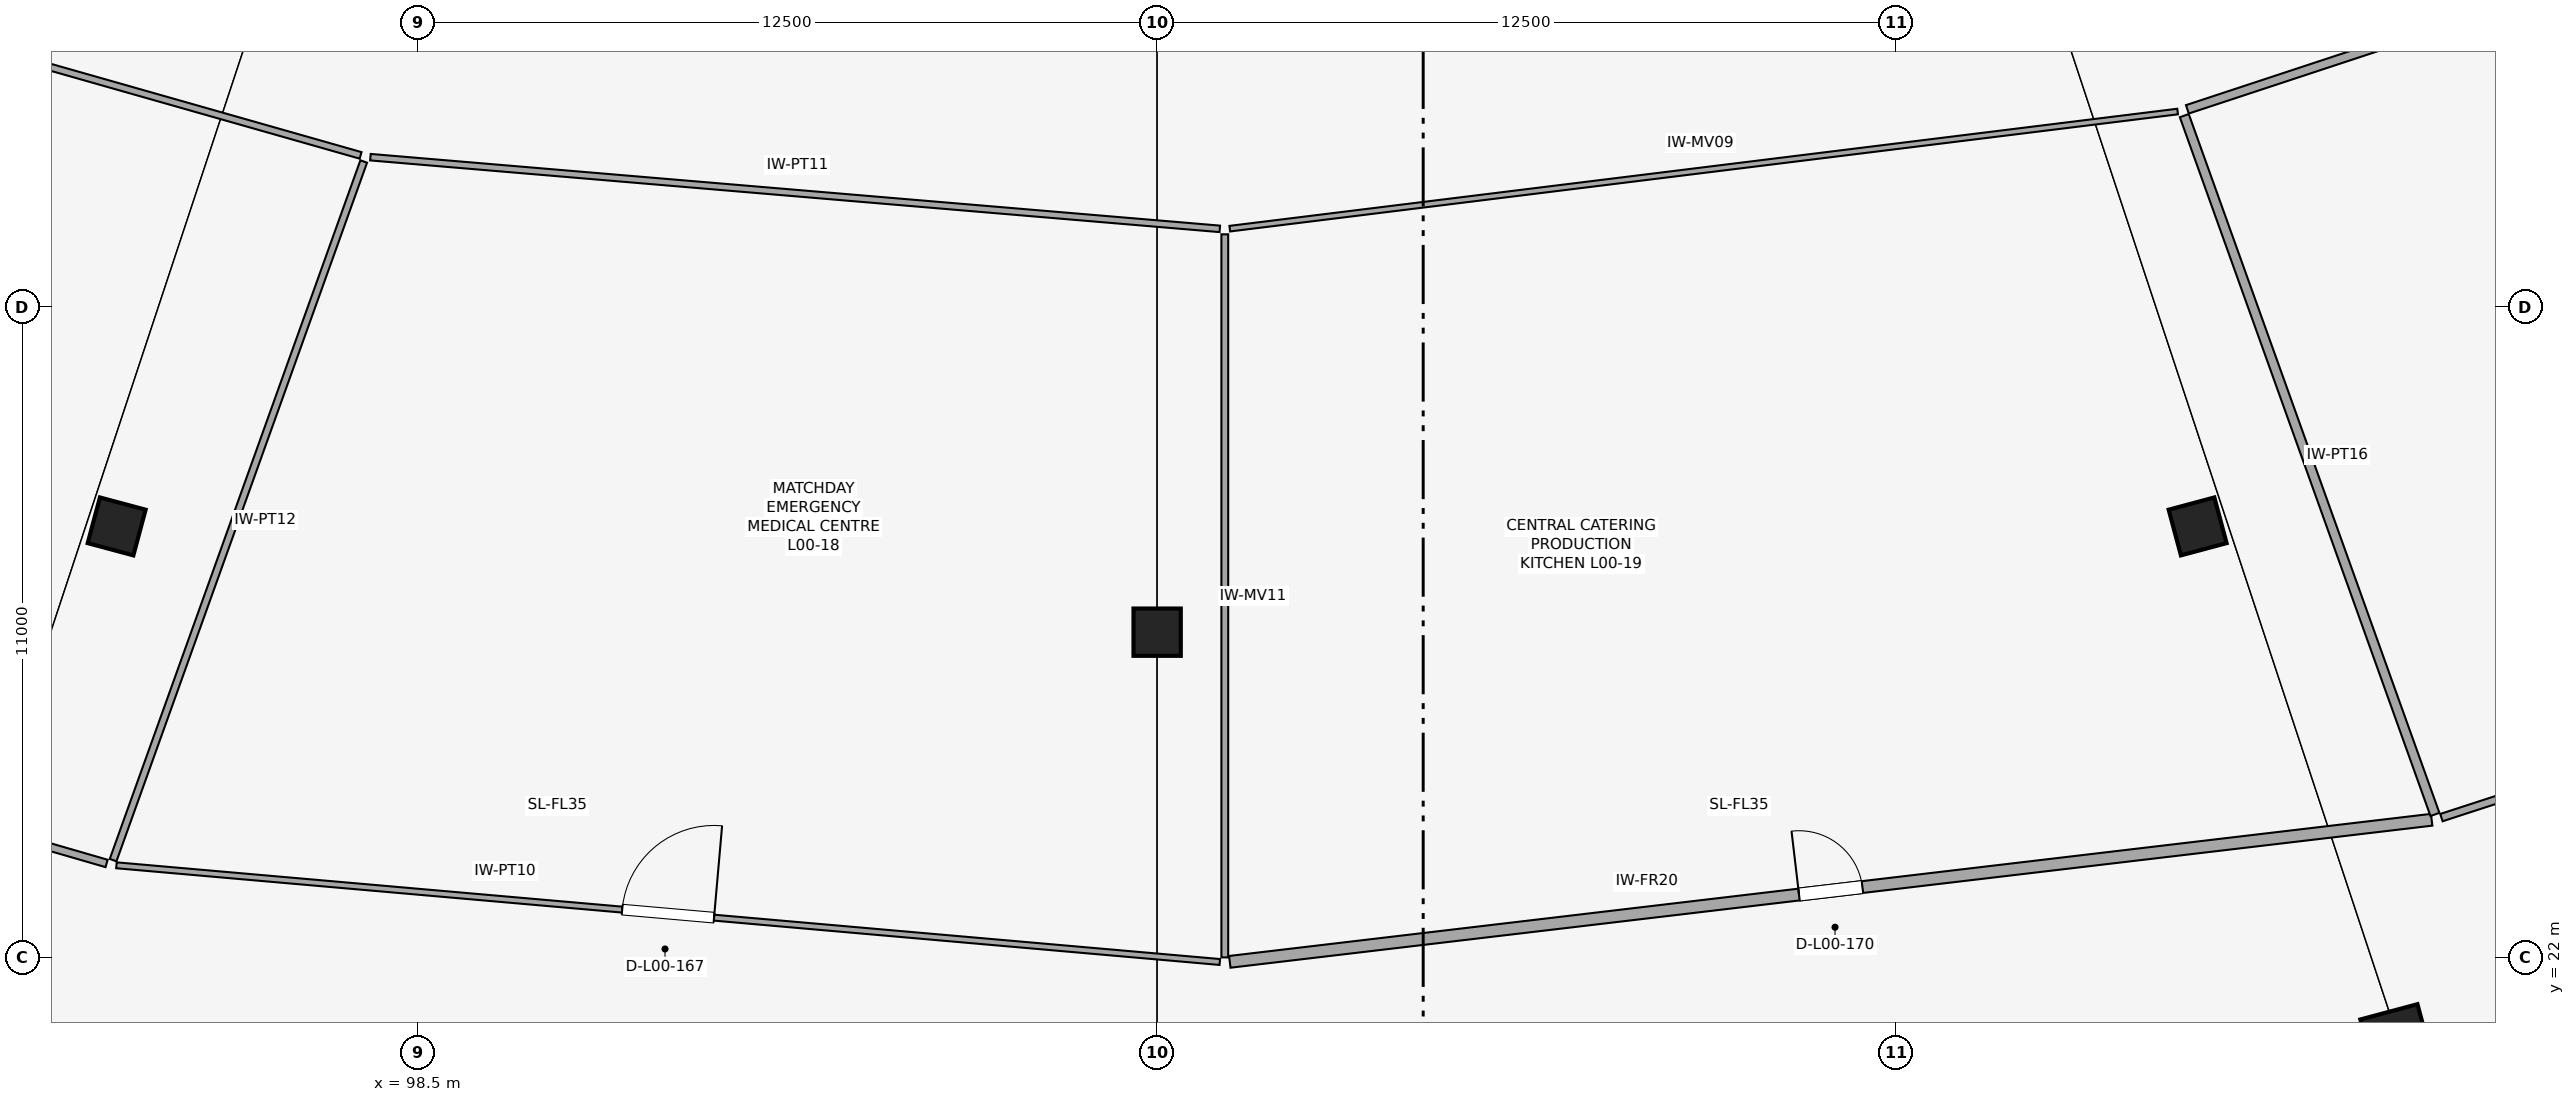
"""IFC4 building model, lengths in metres.
Left out: names, types, materials, properties, quantities, classifications, styles, units other than length and angle.
Written with IfcOpenShell. Run it as: python <this file> out.ifc"""

import sys

from ifc_helpers import new_model, si_unit, direction, frame, frame_2d, origin, origin_2d, place, context, subcontext, project, spatial, rectangle, extrude, element, fill, save


model = new_model("IFC4")
c1 = context("Model", 3, precision=1e-05, world=origin(), true_north=direction((0.0, 1.0)))
c2 = subcontext(c1, "Body", "Model", "MODEL_VIEW")
j1 = project(units=[si_unit("LENGTHUNIT", "METRE"), si_unit("PLANEANGLEUNIT", "RADIAN")], contexts=[c1])
p1 = place(None, origin())
s1 = spatial("IfcSite", under=j1, at=p1, CompositionType="ELEMENT")
p2 = place(p1, origin())
s2 = spatial("IfcBuilding", under=s1, at=p2, CompositionType="ELEMENT")
p3 = place(p2, origin())
s3 = spatial("IfcBuildingStorey", under=s2, at=p3, CompositionType="ELEMENT", Elevation=0.0)
for number, where, z_axis, x_axis in (
    (1, (93.4, 29.289, 0.0), (0.0, 0.0, 1.0), (-0.259, -0.966, 0.0)),
    (2, (111.0, 27.5, 0.0), (0.0, 0.0, 1.0), (0.0, -1.0, 0.0)),
    (3, (128.6, 29.289, 0.0), (0.0, 0.0, 1.0), (0.259, -0.966, 0.0)),
):
    element("IfcColumn", number, at=place(p3, frame(where, z_axis=z_axis, x_axis=x_axis)), inside=s3, PredefinedType="COLUMN", context=c2, shape_type="SweptSolid", body=[
        extrude(rectangle(XDim=0.8, YDim=0.8, at=origin_2d()), origin(), (0.0, 0.0, 1.0), 5.4),
    ])
p4 = place(p3, frame((131.964, 20.596, 0.0), z_axis=(0.0, 0.0, 1.0), x_axis=(0.258819045103, -0.965925826289, 0.0)))
e4 = element("IfcColumn", 4, at=p4, inside=s3, PredefinedType="COLUMN", context=c2, shape_type="SweptSolid", body=[
    extrude(rectangle(XDim=1.0, YDim=1.0, at=origin_2d()), origin(), (0.0, 0.0, 1.0), 5.4),
])
p5 = place(p3, frame((82.46, 39.847, 0.0), z_axis=(0.0, 0.0, 1.0), x_axis=(0.961896561594, -0.273413614865, 0.0)))
e5 = element("IfcWall", 5, at=p5, inside=s3, PredefinedType="MOVABLE", context=c2, shape_type="SweptSolid", body=[
    extrude(rectangle(XDim=15.663, YDim=0.115, at=frame_2d((7.832, 0.0))), origin(), (0.0, 0.0, 1.0), 3.69),
])
p6 = place(p3, frame((85.303, 25.884, 0.0), z_axis=(0.0, 0.0, 1.0), x_axis=(0.960550123967, -0.278106920709, 0.0)))
e6 = element("IfcWall", 6, at=p6, inside=s3, PredefinedType="PARTITIONING", context=c2, shape_type="SweptSolid", body=[
    extrude(rectangle(XDim=8.253, YDim=0.13, at=frame_2d((4.126, 0.0))), origin(), (0.0, 0.0, 1.0), 3.69),
])
p7 = place(p6, frame((1.1, 0.0, 0.0)))
e7 = element("IfcOpeningElement", 7, at=p7, cuts=e6, PredefinedType="OPENING", context=c2, shape_type="SweptSolid", body=[
    extrude(rectangle(XDim=1.44, YDim=2.24, at=frame_2d((0.72, 1.12))), frame((0.0, 0.075, 0.0), z_axis=(0.0, -1.0, 0.0), x_axis=(1.0, 0.0, 0.0)), (0.0, 0.0, 1.0), 0.15),
])
p8 = place(p3, frame((97.579, 35.461, 0.0), z_axis=(0.0, 0.0, 1.0), x_axis=(-0.337651827783, -0.941271078486, 0.0)))
e8 = element("IfcWall", 8, at=p8, inside=s3, PredefinedType="PARTITIONING", context=c2, shape_type="SweptSolid", body=[
    extrude(rectangle(XDim=12.554, YDim=0.12, at=frame_2d((6.277, 0.0))), origin(), (0.0, 0.0, 1.0), 3.69),
])
p9 = place(p3, frame((97.693, 35.534, 0.0), z_axis=(0.0, 0.0, 1.0), x_axis=(0.996458090884, -0.084090862239, 0.0)))
e9 = element("IfcWall", 9, at=p9, inside=s3, PredefinedType="PARTITIONING", context=c2, shape_type="SweptSolid", body=[
    extrude(rectangle(XDim=14.418, YDim=0.11, at=frame_2d((7.209, 0.0))), origin(), (0.0, 0.0, 1.0), 3.69),
])
p10 = place(p3, frame((93.396, 23.557, 0.0), z_axis=(0.0, 0.0, 1.0), x_axis=(0.99618108979, -0.087311146743, 0.0)))
e10 = element("IfcWall", 10, at=p10, inside=s3, PredefinedType="PARTITIONING", context=c2, shape_type="SweptSolid", body=[
    extrude(rectangle(XDim=18.735, YDim=0.1, at=frame_2d((9.367, 0.0))), origin(), (0.0, 0.0, 1.0), 3.69),
])
p11 = place(p10, frame((8.587, 0.0, 0.0)))
e11 = element("IfcOpeningElement", 11, at=p11, cuts=e10, PredefinedType="OPENING", context=c2, shape_type="SweptSolid", body=[
    extrude(rectangle(XDim=1.56, YDim=2.1, at=frame_2d((0.78, 1.05))), frame((0.0, 0.06, 0.0), z_axis=(0.0, -1.0, 0.0), x_axis=(1.0, 0.0, 0.0)), (0.0, 0.0, 1.0), 0.12),
])
p12 = place(p3, frame((112.144, 34.229, 0.0), z_axis=(0.0, 0.0, 1.0), x_axis=(0.0, -1.0, 0.0)))
e12 = element("IfcWall", 12, at=p12, inside=s3, PredefinedType="MOVABLE", context=c2, shape_type="SweptSolid", body=[
    extrude(rectangle(XDim=12.23, YDim=0.115, at=frame_2d((6.115, 0.0))), origin(), (0.0, 0.0, 1.0), 3.69),
])
p13 = place(p3, frame((112.229, 34.325, 0.0), z_axis=(0.0, 0.0, 1.0), x_axis=(0.992450818831, 0.122643272139, 0.0)))
e13 = element("IfcWall", 13, at=p13, inside=s3, PredefinedType="MOVABLE", context=c2, shape_type="SweptSolid", body=[
    extrude(rectangle(XDim=16.154, YDim=0.095, at=frame_2d((8.077, 0.0))), origin(), (0.0, 0.0, 1.0), 3.69),
])
p14 = place(p3, frame((112.229, 21.924, 0.0), z_axis=(0.0, 0.0, 1.0), x_axis=(0.993087286647, 0.11737819687, 0.0)))
e14 = element("IfcWall", 14, at=p14, inside=s3, PredefinedType="PARTITIONING", context=c2, shape_type="SweptSolid", body=[
    extrude(rectangle(XDim=20.471, YDim=0.2, at=frame_2d((10.235, 0.0))), origin(), (0.0, 0.0, 1.0), 3.69),
])
p15 = place(p14, frame((9.695, 0.0, 0.0)))
e15 = element("IfcOpeningElement", 15, at=p15, cuts=e14, PredefinedType="OPENING", context=c2, shape_type="SweptSolid", body=[
    extrude(rectangle(XDim=1.08, YDim=2.1, at=frame_2d((0.54, 1.05))), frame((0.0, 0.11, 0.0), z_axis=(0.0, -1.0, 0.0), x_axis=(1.0, 0.0, 0.0)), (0.0, 0.0, 1.0), 0.22),
])
p16 = place(p3, frame((128.374, 36.237, 0.0), z_axis=(0.0, 0.0, 1.0), x_axis=(0.337646580163, -0.941272960891, 0.0)))
e16 = element("IfcWall", 16, at=p16, inside=s3, PredefinedType="PARTITIONING", context=c2, shape_type="SweptSolid", body=[
    extrude(rectangle(XDim=12.557, YDim=0.16, at=frame_2d((6.278, 0.0))), origin(), (0.0, 0.0, 1.0), 3.69),
])
p17 = place(p3, frame((128.426, 36.343, 0.0), z_axis=(0.0, 0.0, 1.0), x_axis=(0.949703020297, 0.313151997021, 0.0)))
e17 = element("IfcWall", 17, at=p17, inside=s3, PredefinedType="PARTITIONING", context=c2, shape_type="SweptSolid", body=[
    extrude(rectangle(XDim=14.033, YDim=0.15, at=frame_2d((7.017, 0.0))), origin(), (0.0, 0.0, 1.0), 3.69),
])
p18 = place(p3, frame((132.723, 24.364, 0.0), z_axis=(0.0, 0.0, 1.0), x_axis=(0.950997734074, 0.309197848936, 0.0)))
e18 = element("IfcWall", 18, at=p18, inside=s3, PredefinedType="PARTITIONING", context=c2, shape_type="SweptSolid", body=[
    extrude(rectangle(XDim=18.224, YDim=0.13, at=frame_2d((9.112, 0.0))), origin(), (0.0, 0.0, 1.0), 3.69),
])
p19 = place(p18, frame((8.272, 0.0, 0.0)))
e19 = element("IfcOpeningElement", 19, at=p19, cuts=e18, PredefinedType="OPENING", context=c2, shape_type="SweptSolid", body=[
    extrude(rectangle(XDim=1.68, YDim=2.24, at=frame_2d((0.84, 1.12))), frame((0.0, 0.075, 0.0), z_axis=(0.0, -1.0, 0.0), x_axis=(1.0, 0.0, 0.0)), (0.0, 0.0, 1.0), 0.15),
])
p20 = place(p11, origin())
e20 = element("IfcDoor", 20, at=p20, inside=s3, OperationType="SINGLE_SWING_RIGHT", PredefinedType="DOOR", context=c2, shape_type="SweptSolid", body=[
    extrude(rectangle(XDim=1.56, YDim=2.1, at=frame_2d((0.78, 1.05))), frame((0.0, 0.025, 0.0), z_axis=(0.0, -1.0, 0.0), x_axis=(1.0, 0.0, 0.0)), (0.0, 0.0, 1.0), 0.05),
])
fill(e11, e20)
p21 = place(p15, origin())
e21 = element("IfcDoor", 21, at=p21, inside=s3, OperationType="SINGLE_SWING_LEFT", PredefinedType="DOOR", context=c2, shape_type="SweptSolid", body=[
    extrude(rectangle(XDim=1.08, YDim=2.1, at=frame_2d((0.54, 1.05))), frame((0.0, 0.025, 0.0), z_axis=(0.0, -1.0, 0.0), x_axis=(1.0, 0.0, 0.0)), (0.0, 0.0, 1.0), 0.05),
])
fill(e15, e21)
save(model, sys.argv[1])
